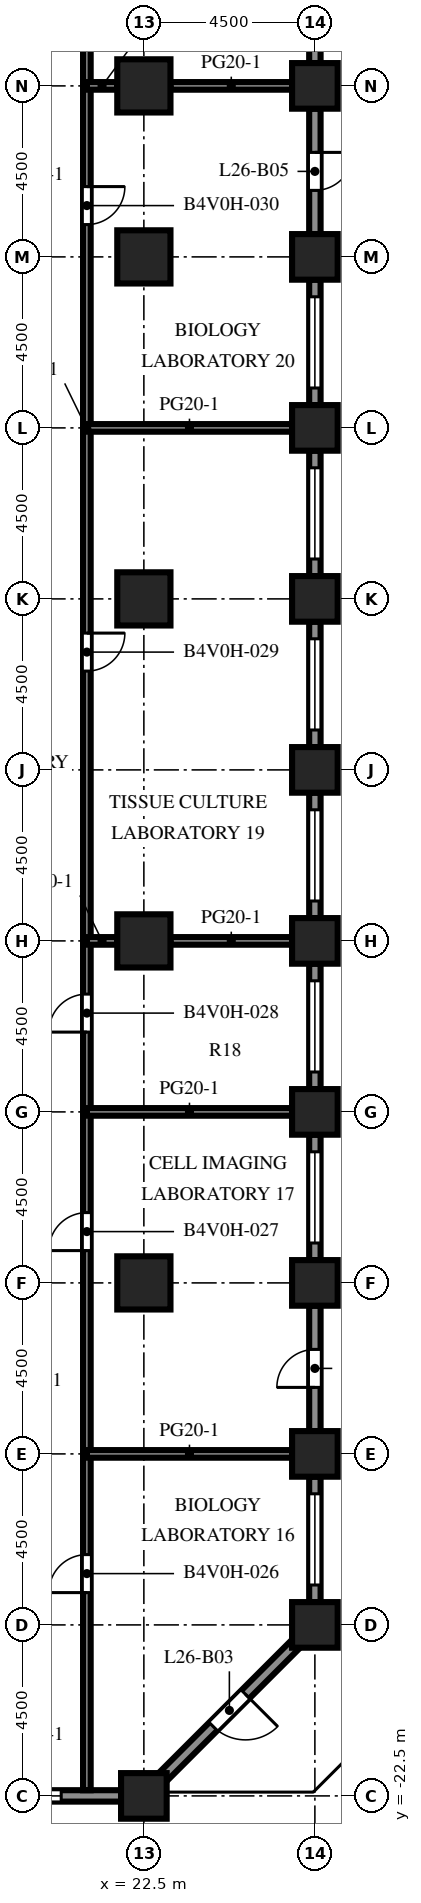
"""IFC4 building model, lengths in metres.
Left out: names, types, materials, properties, quantities, classifications, styles, units other than length and angle.
Written with IfcOpenShell. Run it as: python <this file> out.ifc"""

import sys

from ifc_helpers import new_model, si_unit, direction, frame, frame_2d, origin, origin_2d, place, context, subcontext, project, spatial, rectangle, extrude, element, fill, save


model = new_model("IFC4")
c1 = context("Model", 3, precision=1e-05, world=origin(), true_north=direction((0.0, 1.0)))
c2 = subcontext(c1, "Body", "Model", "MODEL_VIEW")
j1 = project(units=[si_unit("LENGTHUNIT", "METRE"), si_unit("PLANEANGLEUNIT", "RADIAN")], contexts=[c1])
p1 = place(None, origin())
s1 = spatial("IfcSite", under=j1, at=p1, CompositionType="ELEMENT")
p2 = place(p1, origin())
s2 = spatial("IfcBuilding", under=s1, at=p2, CompositionType="ELEMENT")
p3 = place(p2, frame((0.0, 0.0, 116.7)))
s3 = spatial("IfcBuildingStorey", under=s2, at=p3, CompositionType="ELEMENT", Elevation=116.7)
p4 = place(p3, frame((22.5, -22.5, 0.0), z_axis=(0.0, 0.0, 1.0), x_axis=(1.0, 0.0, 0.0)))
e1 = element("IfcColumn", 1, at=p4, inside=s3, PredefinedType="COLUMN", context=c2, shape_type="SweptSolid", body=[
    extrude(rectangle(XDim=1.2, YDim=1.2, at=origin_2d()), origin(), (0.0, 0.0, 1.0), 4.1),
])
for number, where, z_axis, x_axis in (
    (2, (27.0, -18.0, -0.45), (0.0, 0.0, 1.0), (1.0, 0.0, 0.0)),
    (3, (27.0, -13.5, -0.45), (0.0, 0.0, 1.0), (1.0, 0.0, 0.0)),
    (4, (27.0, -9.0, -0.45), (0.0, 0.0, 1.0), (1.0, 0.0, 0.0)),
    (5, (27.0, -4.5, -0.45), (0.0, 0.0, 1.0), (1.0, 0.0, 0.0)),
    (6, (27.0, 0.0, -0.45), (0.0, 0.0, 1.0), (1.0, 0.0, 0.0)),
    (7, (27.0, 4.5, -0.45), (0.0, 0.0, 1.0), (1.0, 0.0, 0.0)),
    (8, (27.0, 9.0, -0.45), (0.0, 0.0, 1.0), (1.0, 0.0, 0.0)),
    (9, (27.0, 13.5, -0.45), (0.0, 0.0, 1.0), (1.0, 0.0, 0.0)),
    (10, (27.0, 18.0, -0.45), (0.0, 0.0, 1.0), (1.0, 0.0, 0.0)),
    (11, (27.0, 22.5, -0.45), (0.0, 0.0, 1.0), (1.0, 0.0, 0.0)),
):
    element("IfcColumn", number, at=place(p3, frame(where, z_axis=z_axis, x_axis=x_axis)), inside=s3, PredefinedType="COLUMN", context=c2, shape_type="SweptSolid", body=[
        extrude(rectangle(XDim=1.2, YDim=1.2, at=origin_2d()), origin(), (0.0, 0.0, 1.0), 4.55),
    ])
for number, where, z_axis, x_axis in (
    (12, (22.5, -9.0, 0.0), (0.0, 0.0, 1.0), (1.0, 0.0, 0.0)),
    (13, (22.5, 0.0, 0.0), (0.0, 0.0, 1.0), (1.0, 0.0, 0.0)),
    (14, (22.5, 9.0, 0.0), (0.0, 0.0, 1.0), (1.0, 0.0, 0.0)),
    (15, (22.5, 18.0, 0.0), (0.0, 0.0, 1.0), (1.0, 0.0, 0.0)),
    (16, (22.5, 22.5, 0.0), (0.0, 0.0, 1.0), (1.0, 0.0, 0.0)),
):
    element("IfcColumn", number, at=place(p3, frame(where, z_axis=z_axis, x_axis=x_axis)), inside=s3, PredefinedType="COLUMN", context=c2, shape_type="SweptSolid", body=[
        extrude(rectangle(XDim=1.4, YDim=1.4, at=origin_2d()), origin(), (0.0, 0.0, 1.0), 4.1),
    ])
p5 = place(p3, frame((21.9, -22.5, 0.0), z_axis=(0.0, 0.0, 1.0), x_axis=(-1.0, 0.0, 0.0)))
e17 = element("IfcWall", 17, at=p5, inside=s3, PredefinedType="SOLIDWALL", context=c2, shape_type="SweptSolid", body=[
    extrude(rectangle(XDim=3.3, YDim=0.3, at=frame_2d((1.65, 0.0))), origin(), (0.0, 0.0, 1.0), 2.75),
])
p6 = place(p5, frame((1.575, 0.0, 0.8)))
e18 = element("IfcOpeningElement", 18, at=p6, cuts=e17, PredefinedType="OPENING", context=c2, shape_type="SweptSolid", body=[
    extrude(rectangle(XDim=1.2, YDim=1.7, at=frame_2d((0.6, 0.85))), frame((0.0, 0.16, 0.0), z_axis=(0.0, -1.0, 0.0), x_axis=(1.0, 0.0, 0.0)), (0.0, 0.0, 1.0), 0.32),
])
p7 = place(p3, frame((26.506, -18.494, 0.0), z_axis=(0.0, 0.0, 1.0), x_axis=(-0.707106781187, -0.707106781187, 0.0)))
e19 = element("IfcWall", 19, at=p7, inside=s3, PredefinedType="SOLIDWALL", context=c2, shape_type="SweptSolid", body=[
    extrude(rectangle(XDim=4.967, YDim=0.3, at=frame_2d((2.483, 0.0))), origin(), (0.0, 0.0, 1.0), 2.75),
])
p8 = place(p7, frame((1.884, 0.0, 0.0)))
e20 = element("IfcOpeningElement", 20, at=p8, cuts=e19, PredefinedType="OPENING", context=c2, shape_type="SweptSolid", body=[
    extrude(rectangle(XDim=1.2, YDim=2.2, at=frame_2d((0.6, 1.1))), frame((0.0, 0.16, 0.0), z_axis=(0.0, -1.0, 0.0), x_axis=(1.0, 0.0, 0.0)), (0.0, 0.0, 1.0), 0.32),
])
p9 = place(p3, frame((27.0, -14.1, 0.0), z_axis=(0.0, 0.0, 1.0), x_axis=(0.0, -1.0, 0.0)))
e21 = element("IfcWall", 21, at=p9, inside=s3, PredefinedType="SOLIDWALL", context=c2, shape_type="SweptSolid", body=[
    extrude(rectangle(XDim=3.3, YDim=0.3, at=frame_2d((1.65, 0.0))), origin(), (0.0, 0.0, 1.0), 2.75),
])
p10 = place(p9, frame((0.45, 0.0, 0.8)))
e22 = element("IfcOpeningElement", 22, at=p10, cuts=e21, PredefinedType="OPENING", context=c2, shape_type="SweptSolid", body=[
    extrude(rectangle(XDim=2.4, YDim=1.7, at=frame_2d((1.2, 0.85))), frame((0.0, 0.16, 0.0), z_axis=(0.0, -1.0, 0.0), x_axis=(1.0, 0.0, 0.0)), (0.0, 0.0, 1.0), 0.32),
])
p11 = place(p3, frame((27.0, -9.6, 0.0), z_axis=(0.0, 0.0, 1.0), x_axis=(0.0, -1.0, 0.0)))
e23 = element("IfcWall", 23, at=p11, inside=s3, PredefinedType="SOLIDWALL", context=c2, shape_type="SweptSolid", body=[
    extrude(rectangle(XDim=3.3, YDim=0.3, at=frame_2d((1.65, 0.0))), origin(), (0.0, 0.0, 1.0), 2.75),
])
p12 = place(p11, frame((1.15, 0.0, 0.0)))
e24 = element("IfcOpeningElement", 24, at=p12, cuts=e23, PredefinedType="OPENING", context=c2, shape_type="SweptSolid", body=[
    extrude(rectangle(XDim=1.0, YDim=2.2, at=frame_2d((0.5, 1.1))), frame((0.0, 0.16, 0.0), z_axis=(0.0, -1.0, 0.0), x_axis=(1.0, 0.0, 0.0)), (0.0, 0.0, 1.0), 0.32),
])
p13 = place(p3, frame((27.0, -5.1, 0.0), z_axis=(0.0, 0.0, 1.0), x_axis=(0.0, -1.0, 0.0)))
e25 = element("IfcWall", 25, at=p13, inside=s3, PredefinedType="SOLIDWALL", context=c2, shape_type="SweptSolid", body=[
    extrude(rectangle(XDim=3.3, YDim=0.3, at=frame_2d((1.65, 0.0))), origin(), (0.0, 0.0, 1.0), 2.75),
])
p14 = place(p13, frame((0.45, 0.0, 0.8)))
e26 = element("IfcOpeningElement", 26, at=p14, cuts=e25, PredefinedType="OPENING", context=c2, shape_type="SweptSolid", body=[
    extrude(rectangle(XDim=2.4, YDim=1.7, at=frame_2d((1.2, 0.85))), frame((0.0, 0.16, 0.0), z_axis=(0.0, -1.0, 0.0), x_axis=(1.0, 0.0, 0.0)), (0.0, 0.0, 1.0), 0.32),
])
p15 = place(p3, frame((27.0, -0.6, 0.0), z_axis=(0.0, 0.0, 1.0), x_axis=(0.0, -1.0, 0.0)))
e27 = element("IfcWall", 27, at=p15, inside=s3, PredefinedType="SOLIDWALL", context=c2, shape_type="SweptSolid", body=[
    extrude(rectangle(XDim=3.3, YDim=0.3, at=frame_2d((1.65, 0.0))), origin(), (0.0, 0.0, 1.0), 2.75),
])
p16 = place(p15, frame((0.45, 0.0, 0.8)))
e28 = element("IfcOpeningElement", 28, at=p16, cuts=e27, PredefinedType="OPENING", context=c2, shape_type="SweptSolid", body=[
    extrude(rectangle(XDim=2.4, YDim=1.7, at=frame_2d((1.2, 0.85))), frame((0.0, 0.16, 0.0), z_axis=(0.0, -1.0, 0.0), x_axis=(1.0, 0.0, 0.0)), (0.0, 0.0, 1.0), 0.32),
])
p17 = place(p3, frame((27.0, 3.9, 0.0), z_axis=(0.0, 0.0, 1.0), x_axis=(0.0, -1.0, 0.0)))
e29 = element("IfcWall", 29, at=p17, inside=s3, PredefinedType="SOLIDWALL", context=c2, shape_type="SweptSolid", body=[
    extrude(rectangle(XDim=3.3, YDim=0.3, at=frame_2d((1.65, 0.0))), origin(), (0.0, 0.0, 1.0), 2.75),
])
p18 = place(p17, frame((0.45, 0.0, 0.8)))
e30 = element("IfcOpeningElement", 30, at=p18, cuts=e29, PredefinedType="OPENING", context=c2, shape_type="SweptSolid", body=[
    extrude(rectangle(XDim=2.4, YDim=1.7, at=frame_2d((1.2, 0.85))), frame((0.0, 0.16, 0.0), z_axis=(0.0, -1.0, 0.0), x_axis=(1.0, 0.0, 0.0)), (0.0, 0.0, 1.0), 0.32),
])
p19 = place(p3, frame((27.0, 8.4, 0.0), z_axis=(0.0, 0.0, 1.0), x_axis=(0.0, -1.0, 0.0)))
e31 = element("IfcWall", 31, at=p19, inside=s3, PredefinedType="SOLIDWALL", context=c2, shape_type="SweptSolid", body=[
    extrude(rectangle(XDim=3.3, YDim=0.3, at=frame_2d((1.65, 0.0))), origin(), (0.0, 0.0, 1.0), 2.75),
])
p20 = place(p19, frame((0.45, 0.0, 0.8)))
e32 = element("IfcOpeningElement", 32, at=p20, cuts=e31, PredefinedType="OPENING", context=c2, shape_type="SweptSolid", body=[
    extrude(rectangle(XDim=2.4, YDim=1.7, at=frame_2d((1.2, 0.85))), frame((0.0, 0.16, 0.0), z_axis=(0.0, -1.0, 0.0), x_axis=(1.0, 0.0, 0.0)), (0.0, 0.0, 1.0), 0.32),
])
p21 = place(p3, frame((27.0, 12.9, 0.0), z_axis=(0.0, 0.0, 1.0), x_axis=(0.0, -1.0, 0.0)))
e33 = element("IfcWall", 33, at=p21, inside=s3, PredefinedType="SOLIDWALL", context=c2, shape_type="SweptSolid", body=[
    extrude(rectangle(XDim=3.3, YDim=0.3, at=frame_2d((1.65, 0.0))), origin(), (0.0, 0.0, 1.0), 2.75),
])
p22 = place(p21, frame((0.45, 0.0, 0.8)))
e34 = element("IfcOpeningElement", 34, at=p22, cuts=e33, PredefinedType="OPENING", context=c2, shape_type="SweptSolid", body=[
    extrude(rectangle(XDim=2.4, YDim=1.7, at=frame_2d((1.2, 0.85))), frame((0.0, 0.16, 0.0), z_axis=(0.0, -1.0, 0.0), x_axis=(1.0, 0.0, 0.0)), (0.0, 0.0, 1.0), 0.32),
])
p23 = place(p3, frame((27.0, 17.4, 0.0), z_axis=(0.0, 0.0, 1.0), x_axis=(0.0, -1.0, 0.0)))
e35 = element("IfcWall", 35, at=p23, inside=s3, PredefinedType="SOLIDWALL", context=c2, shape_type="SweptSolid", body=[
    extrude(rectangle(XDim=3.3, YDim=0.3, at=frame_2d((1.65, 0.0))), origin(), (0.0, 0.0, 1.0), 2.75),
])
p24 = place(p23, frame((0.45, 0.0, 0.8)))
e36 = element("IfcOpeningElement", 36, at=p24, cuts=e35, PredefinedType="OPENING", context=c2, shape_type="SweptSolid", body=[
    extrude(rectangle(XDim=2.4, YDim=1.7, at=frame_2d((1.2, 0.85))), frame((0.0, 0.16, 0.0), z_axis=(0.0, -1.0, 0.0), x_axis=(1.0, 0.0, 0.0)), (0.0, 0.0, 1.0), 0.32),
])
p25 = place(p3, frame((27.0, 21.9, 0.0), z_axis=(0.0, 0.0, 1.0), x_axis=(0.0, -1.0, 0.0)))
e37 = element("IfcWall", 37, at=p25, inside=s3, PredefinedType="SOLIDWALL", context=c2, shape_type="SweptSolid", body=[
    extrude(rectangle(XDim=3.3, YDim=0.3, at=frame_2d((1.65, 0.0))), origin(), (0.0, 0.0, 1.0), 2.75),
])
p26 = place(p25, frame((1.15, 0.0, 0.0)))
e38 = element("IfcOpeningElement", 38, at=p26, cuts=e37, PredefinedType="OPENING", context=c2, shape_type="SweptSolid", body=[
    extrude(rectangle(XDim=1.0, YDim=2.2, at=frame_2d((0.5, 1.1))), frame((0.0, 0.16, 0.0), z_axis=(0.0, -1.0, 0.0), x_axis=(1.0, 0.0, 0.0)), (0.0, 0.0, 1.0), 0.32),
])
p27 = place(p3, frame((27.0, 26.4, 0.0), z_axis=(0.0, 0.0, 1.0), x_axis=(0.0, -1.0, 0.0)))
e39 = element("IfcWall", 39, at=p27, inside=s3, PredefinedType="SOLIDWALL", context=c2, shape_type="SweptSolid", body=[
    extrude(rectangle(XDim=3.3, YDim=0.3, at=frame_2d((1.65, 0.0))), origin(), (0.0, 0.0, 1.0), 2.75),
])
p28 = place(p27, frame((0.45, 0.0, 0.8)))
e40 = element("IfcOpeningElement", 40, at=p28, cuts=e39, PredefinedType="OPENING", context=c2, shape_type="SweptSolid", body=[
    extrude(rectangle(XDim=2.4, YDim=1.7, at=frame_2d((1.2, 0.85))), frame((0.0, 0.16, 0.0), z_axis=(0.0, -1.0, 0.0), x_axis=(1.0, 0.0, 0.0)), (0.0, 0.0, 1.0), 0.32),
])
p29 = place(p3, frame((21.0, 31.35, 0.0), z_axis=(0.0, 0.0, 1.0), x_axis=(0.0, -1.0, 0.0)))
e41 = element("IfcWall", 41, at=p29, inside=s3, PredefinedType="PARTITIONING", context=c2, shape_type="SweptSolid", body=[
    extrude(rectangle(XDim=53.7, YDim=0.2, at=frame_2d((26.85, 0.0))), origin(), (0.0, 0.0, 1.0), 3.65),
])
p30 = place(p29, frame((47.5, 0.0, 0.0)))
e42 = element("IfcOpeningElement", 42, at=p30, cuts=e41, PredefinedType="OPENING", context=c2, shape_type="SweptSolid", body=[
    extrude(rectangle(XDim=1.0, YDim=2.1, at=frame_2d((0.5, 1.05))), frame((0.0, 0.11, 0.0), z_axis=(0.0, -1.0, 0.0), x_axis=(1.0, 0.0, 0.0)), (0.0, 0.0, 1.0), 0.22),
])
p31 = place(p29, frame((38.5, 0.0, 0.0)))
e43 = element("IfcOpeningElement", 43, at=p31, cuts=e41, PredefinedType="OPENING", context=c2, shape_type="SweptSolid", body=[
    extrude(rectangle(XDim=1.0, YDim=2.1, at=frame_2d((0.5, 1.05))), frame((0.0, 0.11, 0.0), z_axis=(0.0, -1.0, 0.0), x_axis=(1.0, 0.0, 0.0)), (0.0, 0.0, 1.0), 0.22),
])
p32 = place(p29, frame((32.75, 0.0, 0.0)))
e44 = element("IfcOpeningElement", 44, at=p32, cuts=e41, PredefinedType="OPENING", context=c2, shape_type="SweptSolid", body=[
    extrude(rectangle(XDim=1.0, YDim=2.1, at=frame_2d((0.5, 1.05))), frame((0.0, 0.11, 0.0), z_axis=(0.0, -1.0, 0.0), x_axis=(1.0, 0.0, 0.0)), (0.0, 0.0, 1.0), 0.22),
])
p33 = place(p29, frame((23.25, 0.0, 0.0)))
e45 = element("IfcOpeningElement", 45, at=p33, cuts=e41, PredefinedType="OPENING", context=c2, shape_type="SweptSolid", body=[
    extrude(rectangle(XDim=1.0, YDim=2.1, at=frame_2d((0.5, 1.05))), frame((0.0, 0.11, 0.0), z_axis=(0.0, -1.0, 0.0), x_axis=(1.0, 0.0, 0.0)), (0.0, 0.0, 1.0), 0.22),
])
p34 = place(p29, frame((11.5, 0.0, 0.0)))
e46 = element("IfcOpeningElement", 46, at=p34, cuts=e41, PredefinedType="OPENING", context=c2, shape_type="SweptSolid", body=[
    extrude(rectangle(XDim=1.0, YDim=2.1, at=frame_2d((0.5, 1.05))), frame((0.0, 0.11, 0.0), z_axis=(0.0, -1.0, 0.0), x_axis=(1.0, 0.0, 0.0)), (0.0, 0.0, 1.0), 0.22),
])
p35 = place(p29, frame((2.5, 0.0, 0.0)))
e47 = element("IfcOpeningElement", 47, at=p35, cuts=e41, PredefinedType="OPENING", context=c2, shape_type="SweptSolid", body=[
    extrude(rectangle(XDim=1.0, YDim=2.1, at=frame_2d((0.5, 1.05))), frame((0.0, 0.11, 0.0), z_axis=(0.0, -1.0, 0.0), x_axis=(1.0, 0.0, 0.0)), (0.0, 0.0, 1.0), 0.22),
])
for number, where, z_axis, x_axis in (
    (48, (21.0, -13.5, 0.0), (0.0, 0.0, 1.0), (1.0, 0.0, 0.0)),
    (49, (21.0, -4.5, 0.0), (0.0, 0.0, 1.0), (1.0, 0.0, 0.0)),
):
    element("IfcWall", number, at=place(p3, frame(where, z_axis=z_axis, x_axis=x_axis)), inside=s3, PredefinedType="PARTITIONING", context=c2, shape_type="SweptSolid", body=[
        extrude(rectangle(XDim=5.4, YDim=0.2, at=frame_2d((2.7, 0.0))), origin(), (0.0, 0.0, 1.0), 3.65),
    ])
p36 = place(p3, frame((21.0, 0.0, 0.0), z_axis=(0.0, 0.0, 1.0), x_axis=(1.0, 0.0, 0.0)))
e50 = element("IfcWall", 50, at=p36, inside=s3, PredefinedType="PARTITIONING", context=c2, shape_type="SweptSolid", body=[
    extrude(rectangle(XDim=0.8, YDim=0.2, at=frame_2d((0.4, 0.0))), origin(), (0.0, 0.0, 1.0), 3.65),
])
p37 = place(p3, frame((23.2, 0.0, 0.0), z_axis=(0.0, 0.0, 1.0), x_axis=(1.0, 0.0, 0.0)))
e51 = element("IfcWall", 51, at=p37, inside=s3, PredefinedType="PARTITIONING", context=c2, shape_type="SweptSolid", body=[
    extrude(rectangle(XDim=3.2, YDim=0.2, at=frame_2d((1.6, 0.0))), origin(), (0.0, 0.0, 1.0), 3.65),
])
p38 = place(p3, frame((21.0, 13.5, 0.0), z_axis=(0.0, 0.0, 1.0), x_axis=(1.0, 0.0, 0.0)))
e52 = element("IfcWall", 52, at=p38, inside=s3, PredefinedType="PARTITIONING", context=c2, shape_type="SweptSolid", body=[
    extrude(rectangle(XDim=5.4, YDim=0.2, at=frame_2d((2.7, 0.0))), origin(), (0.0, 0.0, 1.0), 3.65),
])
p39 = place(p3, frame((21.0, 22.5, 0.0), z_axis=(0.0, 0.0, 1.0), x_axis=(1.0, 0.0, 0.0)))
e53 = element("IfcWall", 53, at=p39, inside=s3, PredefinedType="PARTITIONING", context=c2, shape_type="SweptSolid", body=[
    extrude(rectangle(XDim=0.8, YDim=0.2, at=frame_2d((0.4, 0.0))), origin(), (0.0, 0.0, 1.0), 3.65),
])
p40 = place(p3, frame((23.2, 22.5, 0.0), z_axis=(0.0, 0.0, 1.0), x_axis=(1.0, 0.0, 0.0)))
e54 = element("IfcWall", 54, at=p40, inside=s3, PredefinedType="PARTITIONING", context=c2, shape_type="SweptSolid", body=[
    extrude(rectangle(XDim=3.2, YDim=0.2, at=frame_2d((1.6, 0.0))), origin(), (0.0, 0.0, 1.0), 3.65),
])
p41 = place(p6, origin())
e55 = element("IfcWindow", 55, at=p41, inside=s3, PartitioningType="SINGLE_PANEL", PredefinedType="WINDOW", context=c2, shape_type="SweptSolid", body=[
    extrude(rectangle(XDim=1.2, YDim=1.7, at=frame_2d((0.6, 0.85))), frame((0.0, 0.03, 0.0), z_axis=(0.0, -1.0, 0.0), x_axis=(1.0, 0.0, 0.0)), (0.0, 0.0, 1.0), 0.06),
])
fill(e18, e55)
p42 = place(p8, origin())
e56 = element("IfcDoor", 56, at=p42, inside=s3, OperationType="SINGLE_SWING_LEFT", PredefinedType="DOOR", context=c2, shape_type="SweptSolid", body=[
    extrude(rectangle(XDim=1.2, YDim=2.2, at=frame_2d((0.6, 1.1))), frame((0.0, 0.025, 0.0), z_axis=(0.0, -1.0, 0.0), x_axis=(1.0, 0.0, 0.0)), (0.0, 0.0, 1.0), 0.05),
])
fill(e20, e56)
p43 = place(p10, origin())
e57 = element("IfcWindow", 57, at=p43, inside=s3, PartitioningType="SINGLE_PANEL", PredefinedType="WINDOW", context=c2, shape_type="SweptSolid", body=[
    extrude(rectangle(XDim=2.4, YDim=1.7, at=frame_2d((1.2, 0.85))), frame((0.0, 0.03, 0.0), z_axis=(0.0, -1.0, 0.0), x_axis=(1.0, 0.0, 0.0)), (0.0, 0.0, 1.0), 0.06),
])
fill(e22, e57)
p44 = place(p12, origin())
e58 = element("IfcDoor", 58, at=p44, inside=s3, OperationType="SINGLE_SWING_RIGHT", PredefinedType="DOOR", context=c2, shape_type="SweptSolid", body=[
    extrude(rectangle(XDim=1.0, YDim=2.2, at=frame_2d((0.5, 1.1))), frame((0.0, 0.025, 0.0), z_axis=(0.0, -1.0, 0.0), x_axis=(1.0, 0.0, 0.0)), (0.0, 0.0, 1.0), 0.05),
])
fill(e24, e58)
p45 = place(p14, origin())
e59 = element("IfcWindow", 59, at=p45, inside=s3, PartitioningType="SINGLE_PANEL", PredefinedType="WINDOW", context=c2, shape_type="SweptSolid", body=[
    extrude(rectangle(XDim=2.4, YDim=1.7, at=frame_2d((1.2, 0.85))), frame((0.0, 0.03, 0.0), z_axis=(0.0, -1.0, 0.0), x_axis=(1.0, 0.0, 0.0)), (0.0, 0.0, 1.0), 0.06),
])
fill(e26, e59)
p46 = place(p16, origin())
e60 = element("IfcWindow", 60, at=p46, inside=s3, PartitioningType="SINGLE_PANEL", PredefinedType="WINDOW", context=c2, shape_type="SweptSolid", body=[
    extrude(rectangle(XDim=2.4, YDim=1.7, at=frame_2d((1.2, 0.85))), frame((0.0, 0.03, 0.0), z_axis=(0.0, -1.0, 0.0), x_axis=(1.0, 0.0, 0.0)), (0.0, 0.0, 1.0), 0.06),
])
fill(e28, e60)
p47 = place(p18, origin())
e61 = element("IfcWindow", 61, at=p47, inside=s3, PartitioningType="SINGLE_PANEL", PredefinedType="WINDOW", context=c2, shape_type="SweptSolid", body=[
    extrude(rectangle(XDim=2.4, YDim=1.7, at=frame_2d((1.2, 0.85))), frame((0.0, 0.03, 0.0), z_axis=(0.0, -1.0, 0.0), x_axis=(1.0, 0.0, 0.0)), (0.0, 0.0, 1.0), 0.06),
])
fill(e30, e61)
p48 = place(p20, origin())
e62 = element("IfcWindow", 62, at=p48, inside=s3, PartitioningType="SINGLE_PANEL", PredefinedType="WINDOW", context=c2, shape_type="SweptSolid", body=[
    extrude(rectangle(XDim=2.4, YDim=1.7, at=frame_2d((1.2, 0.85))), frame((0.0, 0.03, 0.0), z_axis=(0.0, -1.0, 0.0), x_axis=(1.0, 0.0, 0.0)), (0.0, 0.0, 1.0), 0.06),
])
fill(e32, e62)
p49 = place(p22, origin())
e63 = element("IfcWindow", 63, at=p49, inside=s3, PartitioningType="SINGLE_PANEL", PredefinedType="WINDOW", context=c2, shape_type="SweptSolid", body=[
    extrude(rectangle(XDim=2.4, YDim=1.7, at=frame_2d((1.2, 0.85))), frame((0.0, 0.03, 0.0), z_axis=(0.0, -1.0, 0.0), x_axis=(1.0, 0.0, 0.0)), (0.0, 0.0, 1.0), 0.06),
])
fill(e34, e63)
p50 = place(p24, origin())
e64 = element("IfcWindow", 64, at=p50, inside=s3, PartitioningType="SINGLE_PANEL", PredefinedType="WINDOW", context=c2, shape_type="SweptSolid", body=[
    extrude(rectangle(XDim=2.4, YDim=1.7, at=frame_2d((1.2, 0.85))), frame((0.0, 0.03, 0.0), z_axis=(0.0, -1.0, 0.0), x_axis=(1.0, 0.0, 0.0)), (0.0, 0.0, 1.0), 0.06),
])
fill(e36, e64)
p51 = place(p26, origin())
e65 = element("IfcDoor", 65, at=p51, inside=s3, OperationType="SINGLE_SWING_LEFT", PredefinedType="DOOR", context=c2, shape_type="SweptSolid", body=[
    extrude(rectangle(XDim=1.0, YDim=2.2, at=frame_2d((0.5, 1.1))), frame((0.0, 0.025, 0.0), z_axis=(0.0, -1.0, 0.0), x_axis=(1.0, 0.0, 0.0)), (0.0, 0.0, 1.0), 0.05),
])
fill(e38, e65)
p52 = place(p30, origin())
e66 = element("IfcDoor", 66, at=p52, inside=s3, OperationType="SINGLE_SWING_RIGHT", PredefinedType="DOOR", context=c2, shape_type="SweptSolid", body=[
    extrude(rectangle(XDim=1.0, YDim=2.1, at=frame_2d((0.5, 1.05))), frame((0.0, 0.025, 0.0), z_axis=(0.0, -1.0, 0.0), x_axis=(1.0, 0.0, 0.0)), (0.0, 0.0, 1.0), 0.05),
])
fill(e42, e66)
p53 = place(p31, origin())
e67 = element("IfcDoor", 67, at=p53, inside=s3, OperationType="SINGLE_SWING_RIGHT", PredefinedType="DOOR", context=c2, shape_type="SweptSolid", body=[
    extrude(rectangle(XDim=1.0, YDim=2.1, at=frame_2d((0.5, 1.05))), frame((0.0, 0.025, 0.0), z_axis=(0.0, -1.0, 0.0), x_axis=(1.0, 0.0, 0.0)), (0.0, 0.0, 1.0), 0.05),
])
fill(e43, e67)
p54 = place(p32, origin())
e68 = element("IfcDoor", 68, at=p54, inside=s3, OperationType="SINGLE_SWING_RIGHT", PredefinedType="DOOR", context=c2, shape_type="SweptSolid", body=[
    extrude(rectangle(XDim=1.0, YDim=2.1, at=frame_2d((0.5, 1.05))), frame((0.0, 0.025, 0.0), z_axis=(0.0, -1.0, 0.0), x_axis=(1.0, 0.0, 0.0)), (0.0, 0.0, 1.0), 0.05),
])
fill(e44, e68)
p55 = place(p33, origin())
e69 = element("IfcDoor", 69, at=p55, inside=s3, OperationType="SINGLE_SWING_LEFT", PredefinedType="DOOR", context=c2, shape_type="SweptSolid", body=[
    extrude(rectangle(XDim=1.0, YDim=2.1, at=frame_2d((0.5, 1.05))), frame((0.0, 0.025, 0.0), z_axis=(0.0, -1.0, 0.0), x_axis=(1.0, 0.0, 0.0)), (0.0, 0.0, 1.0), 0.05),
])
fill(e45, e69)
p56 = place(p34, origin())
e70 = element("IfcDoor", 70, at=p56, inside=s3, OperationType="SINGLE_SWING_LEFT", PredefinedType="DOOR", context=c2, shape_type="SweptSolid", body=[
    extrude(rectangle(XDim=1.0, YDim=2.1, at=frame_2d((0.5, 1.05))), frame((0.0, 0.025, 0.0), z_axis=(0.0, -1.0, 0.0), x_axis=(1.0, 0.0, 0.0)), (0.0, 0.0, 1.0), 0.05),
])
fill(e46, e70)
save(model, sys.argv[1])
